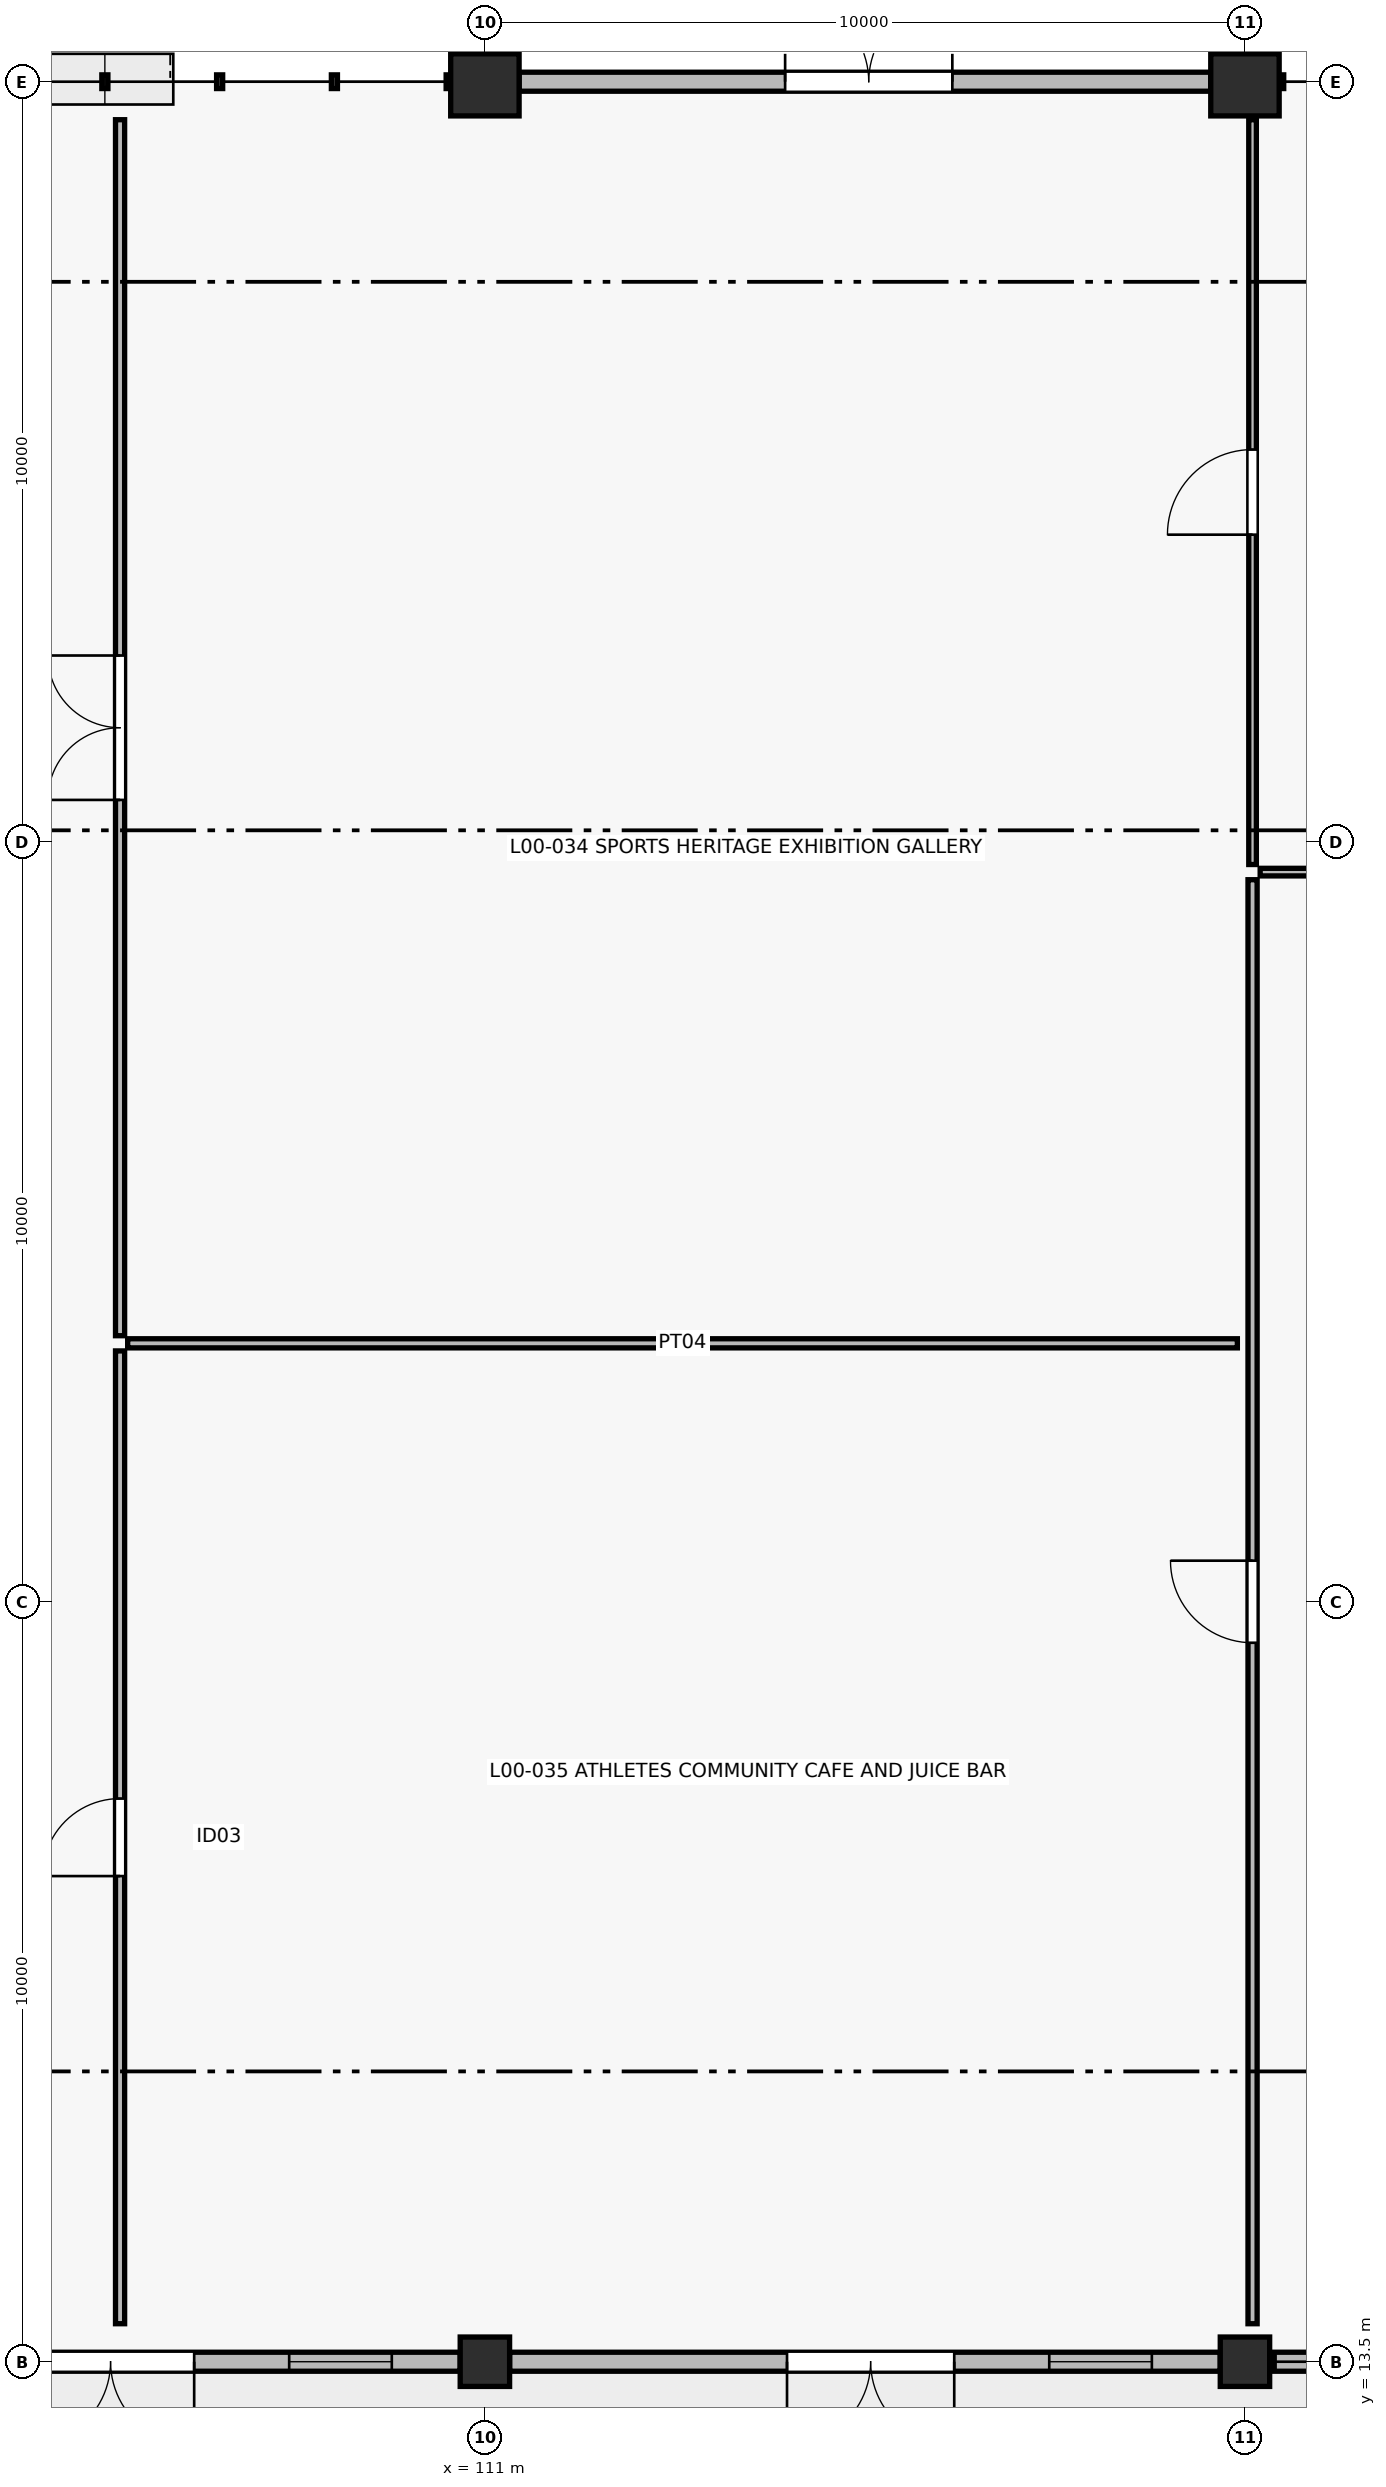
"""IFC4 building model, lengths in metres.
Left out: names, types, materials, properties, quantities, classifications, styles, units other than length and angle.
Written with IfcOpenShell. Run it as: python <this file> out.ifc"""

import sys

from ifc_helpers import new_model, si_unit, direction, frame, frame_2d, origin, origin_2d, place, context, subcontext, project, spatial, rectangle, circle, extrude, element, fill, save


model = new_model("IFC4")
c1 = context("Model", 3, precision=1e-05, world=origin(), true_north=direction((0.0, 1.0)))
c2 = subcontext(c1, "Body", "Model", "MODEL_VIEW")
j1 = project(units=[si_unit("LENGTHUNIT", "METRE"), si_unit("PLANEANGLEUNIT", "RADIAN")], contexts=[c1])
p1 = place(None, origin())
s1 = spatial("IfcSite", under=j1, at=p1, CompositionType="ELEMENT")
p2 = place(p1, origin())
s2 = spatial("IfcBuilding", under=s1, at=p2, CompositionType="ELEMENT")
p3 = place(p2, origin())
s3 = spatial("IfcBuildingStorey", under=s2, at=p3, CompositionType="ELEMENT", Elevation=0.0)
p4 = place(p3, frame((111.0, 13.5, 0.0), z_axis=(0.0, 0.0, 1.0), x_axis=(1.0, 0.0, 0.0)))
e1 = element("IfcColumn", 1, at=p4, inside=s3, PredefinedType="COLUMN", context=c2, shape_type="SweptSolid", body=[
    extrude(rectangle(XDim=0.65, YDim=0.65, at=origin_2d()), origin(), (0.0, 0.0, 1.0), 4.8),
])
p5 = place(p3, frame((111.0, 43.5, 0.0), z_axis=(0.0, 0.0, 1.0), x_axis=(1.0, 0.0, 0.0)))
e2 = element("IfcColumn", 2, at=p5, inside=s3, PredefinedType="COLUMN", context=c2, shape_type="SweptSolid", body=[
    extrude(circle(Radius=0.45, at=origin_2d()), origin(), (0.0, 0.0, 1.0), 4.8),
])
p6 = place(p3, frame((121.0, 13.5, 0.0), z_axis=(0.0, 0.0, 1.0), x_axis=(1.0, 0.0, 0.0)))
e3 = element("IfcColumn", 3, at=p6, inside=s3, PredefinedType="COLUMN", context=c2, shape_type="SweptSolid", body=[
    extrude(rectangle(XDim=0.65, YDim=0.65, at=origin_2d()), origin(), (0.0, 0.0, 1.0), 4.8),
])
p7 = place(p3, frame((121.0, 43.5, 0.0), z_axis=(0.0, 0.0, 1.0), x_axis=(1.0, 0.0, 0.0)))
e4 = element("IfcColumn", 4, at=p7, inside=s3, PredefinedType="COLUMN", context=c2, shape_type="SweptSolid", body=[
    extrude(circle(Radius=0.45, at=origin_2d()), origin(), (0.0, 0.0, 1.0), 4.8),
])
p8 = place(p3, frame((110.675, 13.5, 0.0), z_axis=(0.0, 0.0, 1.0), x_axis=(-1.0, 0.0, 0.0)))
e5 = element("IfcWall", 5, at=p8, inside=s3, PredefinedType="SOLIDWALL", context=c2, shape_type="SweptSolid", body=[
    extrude(rectangle(XDim=9.35, YDim=0.25, at=frame_2d((4.675, 0.0))), origin(), (0.0, 0.0, 1.0), 2.605),
])
p9 = place(p8, frame((3.5, 0.0, 0.0)))
e6 = element("IfcOpeningElement", 6, at=p9, cuts=e5, PredefinedType="OPENING", context=c2, shape_type="SweptSolid", body=[
    extrude(rectangle(XDim=2.2, YDim=2.4, at=frame_2d((1.1, 1.2))), frame((0.0, 0.135, 0.0), z_axis=(0.0, -1.0, 0.0), x_axis=(1.0, 0.0, 0.0)), (0.0, 0.0, 1.0), 0.27),
])
p10 = place(p8, frame((0.9, 0.0, 0.85)))
e7 = element("IfcOpeningElement", 7, at=p10, cuts=e5, PredefinedType="OPENING", context=c2, shape_type="SweptSolid", body=[
    extrude(rectangle(XDim=1.35, YDim=1.5, at=frame_2d((0.675, 0.75))), frame((0.0, 0.135, 0.0), z_axis=(0.0, -1.0, 0.0), x_axis=(1.0, 0.0, 0.0)), (0.0, 0.0, 1.0), 0.27),
])
p11 = place(p3, frame((120.675, 13.5, 0.0), z_axis=(0.0, 0.0, 1.0), x_axis=(-1.0, 0.0, 0.0)))
e8 = element("IfcWall", 8, at=p11, inside=s3, PredefinedType="SOLIDWALL", context=c2, shape_type="SweptSolid", body=[
    extrude(rectangle(XDim=9.35, YDim=0.25, at=frame_2d((4.675, 0.0))), origin(), (0.0, 0.0, 1.0), 2.605),
])
p12 = place(p11, frame((3.5, 0.0, 0.0)))
e9 = element("IfcOpeningElement", 9, at=p12, cuts=e8, PredefinedType="OPENING", context=c2, shape_type="SweptSolid", body=[
    extrude(rectangle(XDim=2.2, YDim=2.4, at=frame_2d((1.1, 1.2))), frame((0.0, 0.135, 0.0), z_axis=(0.0, -1.0, 0.0), x_axis=(1.0, 0.0, 0.0)), (0.0, 0.0, 1.0), 0.27),
])
p13 = place(p11, frame((0.9, 0.0, 0.85)))
e10 = element("IfcOpeningElement", 10, at=p13, cuts=e8, PredefinedType="OPENING", context=c2, shape_type="SweptSolid", body=[
    extrude(rectangle(XDim=1.35, YDim=1.5, at=frame_2d((0.675, 0.75))), frame((0.0, 0.135, 0.0), z_axis=(0.0, -1.0, 0.0), x_axis=(1.0, 0.0, 0.0)), (0.0, 0.0, 1.0), 0.27),
])
p14 = place(p3, frame((111.45, 43.5, 0.0), z_axis=(0.0, 0.0, 1.0), x_axis=(1.0, 0.0, 0.0)))
e11 = element("IfcWall", 11, at=p14, inside=s3, PredefinedType="SOLIDWALL", context=c2, shape_type="SweptSolid", body=[
    extrude(rectangle(XDim=9.1, YDim=0.25, at=frame_2d((4.55, 0.0))), origin(), (0.0, 0.0, 1.0), 2.605),
])
p15 = place(p14, frame((3.5, 0.0, 0.0)))
e12 = element("IfcOpeningElement", 12, at=p15, cuts=e11, PredefinedType="OPENING", context=c2, shape_type="SweptSolid", body=[
    extrude(rectangle(XDim=2.2, YDim=2.4, at=frame_2d((1.1, 1.2))), frame((0.0, 0.135, 0.0), z_axis=(0.0, -1.0, 0.0), x_axis=(1.0, 0.0, 0.0)), (0.0, 0.0, 1.0), 0.27),
])
p16 = place(p3, frame((130.675, 13.5, 0.0), z_axis=(0.0, 0.0, 1.0), x_axis=(-1.0, 0.0, 0.0)))
e13 = element("IfcWall", 13, at=p16, inside=s3, PredefinedType="SOLIDWALL", context=c2, shape_type="SweptSolid", body=[
    extrude(rectangle(XDim=9.35, YDim=0.25, at=frame_2d((4.675, 0.0))), origin(), (0.0, 0.0, 1.0), 2.605),
])
p17 = place(p3, frame((106.2, 14.0, 0.0), z_axis=(0.0, 0.0, 1.0), x_axis=(0.0, 1.0, 0.0)))
e14 = element("IfcWall", 14, at=p17, inside=s3, PredefinedType="PARTITIONING", context=c2, shape_type="SweptSolid", body=[
    extrude(rectangle(XDim=12.8, YDim=0.12, at=frame_2d((6.4, 0.0))), origin(), (0.0, 0.0, 1.0), 4.245),
])
p18 = place(p17, frame((5.89, 0.0, 0.0)))
e15 = element("IfcOpeningElement", 15, at=p18, cuts=e14, PredefinedType="OPENING", context=c2, shape_type="SweptSolid", body=[
    extrude(rectangle(XDim=1.02, YDim=2.15, at=frame_2d((0.51, 1.075))), frame((0.0, 0.07, 0.0), z_axis=(0.0, -1.0, 0.0), x_axis=(1.0, 0.0, 0.0)), (0.0, 0.0, 1.0), 0.14),
])
p19 = place(p3, frame((106.2, 27.0, 0.0), z_axis=(0.0, 0.0, 1.0), x_axis=(0.0, 1.0, 0.0)))
e16 = element("IfcWall", 16, at=p19, inside=s3, PredefinedType="PARTITIONING", context=c2, shape_type="SweptSolid", body=[
    extrude(rectangle(XDim=16.0, YDim=0.12, at=frame_2d((8.0, 0.0))), origin(), (0.0, 0.0, 1.0), 4.245),
])
p20 = place(p19, frame((7.05, 0.0, 0.0)))
e17 = element("IfcOpeningElement", 17, at=p20, cuts=e16, PredefinedType="OPENING", context=c2, shape_type="SweptSolid", body=[
    extrude(rectangle(XDim=1.9, YDim=2.3, at=frame_2d((0.95, 1.15))), frame((0.0, 0.07, 0.0), z_axis=(0.0, -1.0, 0.0), x_axis=(1.0, 0.0, 0.0)), (0.0, 0.0, 1.0), 0.14),
])
p21 = place(p3, frame((106.3, 26.9, 0.0), z_axis=(0.0, 0.0, 1.0), x_axis=(1.0, 0.0, 0.0)))
e18 = element("IfcWall", 18, at=p21, inside=s3, PredefinedType="PARTITIONING", context=c2, shape_type="SweptSolid", body=[
    extrude(rectangle(XDim=14.6, YDim=0.12, at=frame_2d((7.3, 0.0))), origin(), (0.0, 0.0, 1.0), 2.605),
])
p22 = place(p3, frame((121.1, 14.0, 0.0), z_axis=(0.0, 0.0, 1.0), x_axis=(0.0, 1.0, 0.0)))
e19 = element("IfcWall", 19, at=p22, inside=s3, PredefinedType="PARTITIONING", context=c2, shape_type="SweptSolid", body=[
    extrude(rectangle(XDim=19.0, YDim=0.12, at=frame_2d((9.5, 0.0))), origin(), (0.0, 0.0, 1.0), 2.605),
])
p23 = place(p22, frame((8.96, 0.0, 0.0)))
e20 = element("IfcOpeningElement", 20, at=p23, cuts=e19, PredefinedType="OPENING", context=c2, shape_type="SweptSolid", body=[
    extrude(rectangle(XDim=1.08, YDim=2.15, at=frame_2d((0.54, 1.075))), frame((0.0, 0.07, 0.0), z_axis=(0.0, -1.0, 0.0), x_axis=(1.0, 0.0, 0.0)), (0.0, 0.0, 1.0), 0.14),
])
p24 = place(p3, frame((121.1, 33.2, 0.0), z_axis=(0.0, 0.0, 1.0), x_axis=(0.0, 1.0, 0.0)))
e21 = element("IfcWall", 21, at=p24, inside=s3, PredefinedType="PARTITIONING", context=c2, shape_type="SweptSolid", body=[
    extrude(rectangle(XDim=9.8, YDim=0.1, at=frame_2d((4.9, 0.0))), origin(), (0.0, 0.0, 1.0), 2.605),
])
p25 = place(p24, frame((4.34, 0.0, 0.0)))
e22 = element("IfcOpeningElement", 22, at=p25, cuts=e21, PredefinedType="OPENING", context=c2, shape_type="SweptSolid", body=[
    extrude(rectangle(XDim=1.12, YDim=2.15, at=frame_2d((0.56, 1.075))), frame((0.0, 0.06, 0.0), z_axis=(0.0, -1.0, 0.0), x_axis=(1.0, 0.0, 0.0)), (0.0, 0.0, 1.0), 0.12),
])
p26 = place(p3, frame((121.2, 33.1, 0.0), z_axis=(0.0, 0.0, 1.0), x_axis=(1.0, 0.0, 0.0)))
e23 = element("IfcWall", 23, at=p26, inside=s3, PredefinedType="PARTITIONING", context=c2, shape_type="SweptSolid", body=[
    extrude(rectangle(XDim=9.3, YDim=0.1, at=frame_2d((4.65, 0.0))), origin(), (0.0, 0.0, 1.0), 2.605),
])
p27 = place(p9, origin())
e24 = element("IfcDoor", 24, at=p27, inside=s3, OperationType="DOUBLE_DOOR_SINGLE_SWING", PredefinedType="DOOR", context=c2, shape_type="SweptSolid", body=[
    extrude(rectangle(XDim=2.2, YDim=2.4, at=frame_2d((1.1, 1.2))), frame((0.0, 0.025, 0.0), z_axis=(0.0, -1.0, 0.0), x_axis=(1.0, 0.0, 0.0)), (0.0, 0.0, 1.0), 0.05),
])
fill(e6, e24)
p28 = place(p10, origin())
e25 = element("IfcWindow", 25, at=p28, inside=s3, PartitioningType="SINGLE_PANEL", PredefinedType="WINDOW", context=c2, shape_type="SweptSolid", body=[
    extrude(rectangle(XDim=1.35, YDim=1.5, at=frame_2d((0.675, 0.75))), frame((0.0, 0.03, 0.0), z_axis=(0.0, -1.0, 0.0), x_axis=(1.0, 0.0, 0.0)), (0.0, 0.0, 1.0), 0.06),
])
fill(e7, e25)
p29 = place(p12, origin())
e26 = element("IfcDoor", 26, at=p29, inside=s3, OperationType="DOUBLE_DOOR_SINGLE_SWING", PredefinedType="DOOR", context=c2, shape_type="SweptSolid", body=[
    extrude(rectangle(XDim=2.2, YDim=2.4, at=frame_2d((1.1, 1.2))), frame((0.0, 0.025, 0.0), z_axis=(0.0, -1.0, 0.0), x_axis=(1.0, 0.0, 0.0)), (0.0, 0.0, 1.0), 0.05),
])
fill(e9, e26)
p30 = place(p13, origin())
e27 = element("IfcWindow", 27, at=p30, inside=s3, PartitioningType="SINGLE_PANEL", PredefinedType="WINDOW", context=c2, shape_type="SweptSolid", body=[
    extrude(rectangle(XDim=1.35, YDim=1.5, at=frame_2d((0.675, 0.75))), frame((0.0, 0.03, 0.0), z_axis=(0.0, -1.0, 0.0), x_axis=(1.0, 0.0, 0.0)), (0.0, 0.0, 1.0), 0.06),
])
fill(e10, e27)
p31 = place(p15, origin())
e28 = element("IfcDoor", 28, at=p31, inside=s3, OperationType="DOUBLE_DOOR_SINGLE_SWING", PredefinedType="DOOR", context=c2, shape_type="SweptSolid", body=[
    extrude(rectangle(XDim=2.2, YDim=2.4, at=frame_2d((1.1, 1.2))), frame((0.0, 0.025, 0.0), z_axis=(0.0, -1.0, 0.0), x_axis=(1.0, 0.0, 0.0)), (0.0, 0.0, 1.0), 0.05),
])
fill(e12, e28)
p32 = place(p18, origin())
e29 = element("IfcDoor", 29, at=p32, inside=s3, OperationType="SINGLE_SWING_LEFT", PredefinedType="DOOR", context=c2, shape_type="SweptSolid", body=[
    extrude(rectangle(XDim=1.02, YDim=2.15, at=frame_2d((0.51, 1.075))), frame((0.0, 0.025, 0.0), z_axis=(0.0, -1.0, 0.0), x_axis=(1.0, 0.0, 0.0)), (0.0, 0.0, 1.0), 0.05),
])
fill(e15, e29)
p33 = place(p20, origin())
e30 = element("IfcDoor", 30, at=p33, inside=s3, OperationType="DOUBLE_DOOR_SINGLE_SWING", PredefinedType="DOOR", context=c2, shape_type="SweptSolid", body=[
    extrude(rectangle(XDim=1.9, YDim=2.3, at=frame_2d((0.95, 1.15))), frame((0.0, 0.025, 0.0), z_axis=(0.0, -1.0, 0.0), x_axis=(1.0, 0.0, 0.0)), (0.0, 0.0, 1.0), 0.05),
])
fill(e17, e30)
p34 = place(p23, origin())
e31 = element("IfcDoor", 31, at=p34, inside=s3, OperationType="SINGLE_SWING_RIGHT", PredefinedType="DOOR", context=c2, shape_type="SweptSolid", body=[
    extrude(rectangle(XDim=1.08, YDim=2.15, at=frame_2d((0.54, 1.075))), frame((0.0, 0.025, 0.0), z_axis=(0.0, -1.0, 0.0), x_axis=(1.0, 0.0, 0.0)), (0.0, 0.0, 1.0), 0.05),
])
fill(e20, e31)
p35 = place(p25, origin())
e32 = element("IfcDoor", 32, at=p35, inside=s3, OperationType="SINGLE_SWING_LEFT", PredefinedType="DOOR", context=c2, shape_type="SweptSolid", body=[
    extrude(rectangle(XDim=1.12, YDim=2.15, at=frame_2d((0.56, 1.075))), frame((0.0, 0.025, 0.0), z_axis=(0.0, -1.0, 0.0), x_axis=(1.0, 0.0, 0.0)), (0.0, 0.0, 1.0), 0.05),
])
fill(e22, e32)
save(model, sys.argv[1])
